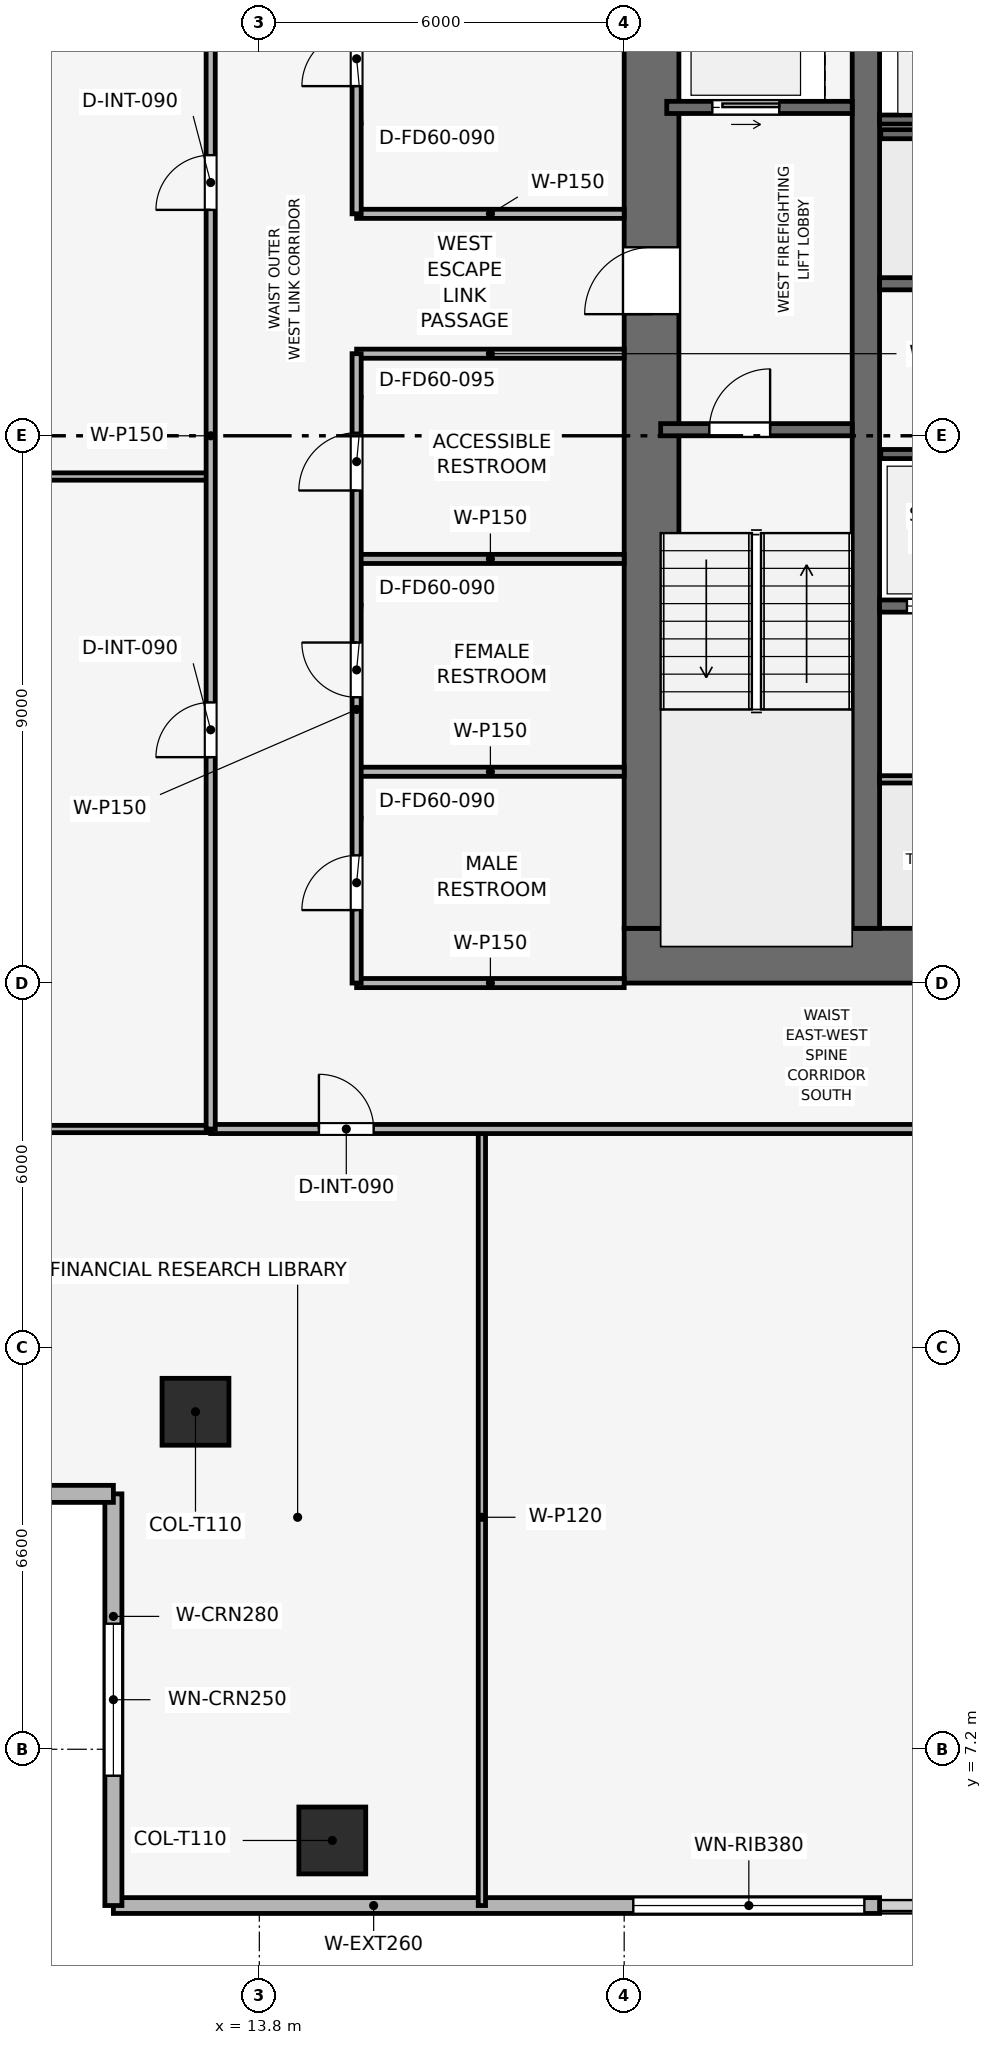
"""IFC4 building model, lengths in metres.
Left out: names, types, materials, properties, quantities, classifications, styles, units other than length and angle.
Written with IfcOpenShell. Run it as: python <this file> out.ifc"""

import sys

from ifc_helpers import new_model, si_unit, direction, frame, frame_2d, origin, origin_2d, place, context, subcontext, project, spatial, rectangle, extrude, element, fill, save


model = new_model("IFC4")
c1 = context("Model", 3, precision=1e-05, world=origin(), true_north=direction((0.0, 1.0)))
c2 = subcontext(c1, "Body", "Model", "MODEL_VIEW")
j1 = project(units=[si_unit("LENGTHUNIT", "METRE"), si_unit("PLANEANGLEUNIT", "RADIAN")], contexts=[c1])
p1 = place(None, origin())
s1 = spatial("IfcSite", under=j1, at=p1, CompositionType="ELEMENT")
p2 = place(p1, origin())
s2 = spatial("IfcBuilding", under=s1, at=p2, CompositionType="ELEMENT")
p3 = place(p2, frame((0.0, 0.0, 164.55)))
s3 = spatial("IfcBuildingStorey", under=s2, at=p3, CompositionType="ELEMENT", Elevation=164.55)
p4 = place(p3, frame((19.8, 20.25, 0.0), z_axis=(0.0, 0.0, 1.0), x_axis=(1.0, 0.0, 0.0)))
e1 = element("IfcWall", 1, at=p4, inside=s3, PredefinedType="SHEAR", context=c2, shape_type="SweptSolid", body=[
    extrude(rectangle(XDim=18.0, YDim=0.9, at=frame_2d((9.0, 0.0))), origin(), (0.0, 0.0, 1.0), 3.75),
])
p5 = place(p4, frame((8.4, 0.0, 0.0)))
e2 = element("IfcOpeningElement", 2, at=p5, cuts=e1, PredefinedType="OPENING", context=c2, shape_type="SweptSolid", body=[
    extrude(rectangle(XDim=1.2, YDim=2.2, at=frame_2d((0.6, 1.1))), frame((0.0, 0.46, 0.0), z_axis=(0.0, -1.0, 0.0), x_axis=(1.0, 0.0, 0.0)), (0.0, 0.0, 1.0), 0.92),
])
p6 = place(p3, frame((20.25, 20.7, 0.0), z_axis=(0.0, 0.0, 1.0), x_axis=(0.0, 1.0, 0.0)))
e3 = element("IfcWall", 3, at=p6, inside=s3, PredefinedType="SHEAR", context=c2, shape_type="SweptSolid", body=[
    extrude(rectangle(XDim=16.2, YDim=0.9, at=frame_2d((8.1, 0.0))), origin(), (0.0, 0.0, 1.0), 3.75),
])
p7 = place(p6, frame((10.1, 0.0, 0.0)))
e4 = element("IfcOpeningElement", 4, at=p7, cuts=e3, PredefinedType="OPENING", context=c2, shape_type="SweptSolid", body=[
    extrude(rectangle(XDim=1.1, YDim=2.15, at=frame_2d((0.55, 1.075))), frame((0.0, 0.46, 0.0), z_axis=(0.0, -1.0, 0.0), x_axis=(1.0, 0.0, 0.0)), (0.0, 0.0, 1.0), 0.92),
])
p8 = place(p3, frame((23.775, 20.7, 0.0), z_axis=(0.0, 0.0, 1.0), x_axis=(0.0, 1.0, 0.0)))
e5 = element("IfcWall", 5, at=p8, inside=s3, PredefinedType="SHEAR", context=c2, shape_type="SweptSolid", body=[
    extrude(rectangle(XDim=16.2, YDim=0.45, at=frame_2d((8.1, 0.0))), origin(), (0.0, 0.0, 1.0), 3.75),
])
for number, where, z_axis, x_axis in (
    (6, (15.0, 5.7, 0.003), (0.0, 0.0, 1.0), (1.0, 0.0, 0.0)),
    (7, (12.75, 12.75, 0.003), (0.0, 0.0, 1.0), (1.0, 0.0, 0.0)),
):
    element("IfcColumn", number, at=place(p3, frame(where, z_axis=z_axis, x_axis=x_axis)), inside=s3, PredefinedType="COLUMN", context=c2, shape_type="SweptSolid", body=[
        extrude(rectangle(XDim=1.1, YDim=1.1, at=origin_2d()), origin(), (0.0, 0.0, 1.0), 3.489),
    ])
p9 = place(p3, frame((24.0, 4.63, 0.0), z_axis=(0.0, 0.0, 1.0), x_axis=(-1.0, 0.0, 0.0)))
e8 = element("IfcWall", 8, at=p9, inside=s3, PredefinedType="SOLIDWALL", context=c2, shape_type="SweptSolid", body=[
    extrude(rectangle(XDim=12.6, YDim=0.26, at=frame_2d((6.3, 0.0))), origin(), (0.0, 0.0, 1.0), 3.495),
])
p10 = place(p9, frame((0.25, 0.0, 0.9)))
e9 = element("IfcOpeningElement", 9, at=p10, cuts=e8, PredefinedType="OPENING", context=c2, shape_type="SweptSolid", body=[
    extrude(rectangle(XDim=3.8, YDim=1.9, at=frame_2d((1.9, 0.95))), frame((0.0, 0.14, 0.0), z_axis=(0.0, -1.0, 0.0), x_axis=(1.0, 0.0, 0.0)), (0.0, 0.0, 1.0), 0.28),
])
p11 = place(p3, frame((11.4, 4.63, 0.0), z_axis=(0.0, 0.0, 1.0), x_axis=(0.0, 1.0, 0.0)))
e10 = element("IfcWall", 10, at=p11, inside=s3, PredefinedType="SOLIDWALL", context=c2, shape_type="SweptSolid", body=[
    extrude(rectangle(XDim=6.77, YDim=0.28, at=frame_2d((3.385, 0.0))), origin(), (0.0, 0.0, 1.0), 3.495),
])
p12 = place(p11, frame((2.135, 0.0, 0.9)))
e11 = element("IfcOpeningElement", 11, at=p12, cuts=e10, PredefinedType="OPENING", context=c2, shape_type="SweptSolid", body=[
    extrude(rectangle(XDim=2.5, YDim=1.9, at=frame_2d((1.25, 0.95))), frame((0.0, 0.15, 0.0), z_axis=(0.0, -1.0, 0.0), x_axis=(1.0, 0.0, 0.0)), (0.0, 0.0, 1.0), 0.3),
])
p13 = place(p3, frame((11.4, 11.4, 0.0), z_axis=(0.0, 0.0, 1.0), x_axis=(-1.0, 0.0, 0.0)))
e12 = element("IfcWall", 12, at=p13, inside=s3, PredefinedType="SOLIDWALL", context=c2, shape_type="SweptSolid", body=[
    extrude(rectangle(XDim=6.77, YDim=0.28, at=frame_2d((3.385, 0.0))), origin(), (0.0, 0.0, 1.0), 3.495),
])
p14 = place(p13, frame((2.135, 0.0, 0.9)))
e13 = element("IfcOpeningElement", 13, at=p14, cuts=e12, PredefinedType="OPENING", context=c2, shape_type="SweptSolid", body=[
    extrude(rectangle(XDim=2.5, YDim=1.9, at=frame_2d((1.25, 0.95))), frame((0.0, 0.15, 0.0), z_axis=(0.0, -1.0, 0.0), x_axis=(1.0, 0.0, 0.0)), (0.0, 0.0, 1.0), 0.3),
])
p15 = place(p3, frame((20.4, 28.9, 0.0), z_axis=(0.0, 0.0, 1.0), x_axis=(1.0, 0.0, 0.0)))
e14 = element("IfcWall", 14, at=p15, inside=s3, PredefinedType="SHEAR", context=c2, shape_type="SweptSolid", body=[
    extrude(rectangle(XDim=3.15, YDim=0.2, at=frame_2d((1.575, 0.0))), origin(), (0.0, 0.0, 1.0), 3.495),
])
p16 = place(p15, frame((0.8, 0.0, 0.0)))
e15 = element("IfcOpeningElement", 15, at=p16, cuts=e14, PredefinedType="OPENING", context=c2, shape_type="SweptSolid", body=[
    extrude(rectangle(XDim=1.0, YDim=2.1, at=frame_2d((0.5, 1.05))), frame((0.0, 0.11, 0.0), z_axis=(0.0, -1.0, 0.0), x_axis=(1.0, 0.0, 0.0)), (0.0, 0.0, 1.0), 0.22),
])
p17 = place(p3, frame((20.5, 34.2, 0.0), z_axis=(0.0, 0.0, 1.0), x_axis=(1.0, 0.0, 0.0)))
e16 = element("IfcWall", 16, at=p17, inside=s3, PredefinedType="SHEAR", context=c2, shape_type="SweptSolid", body=[
    extrude(rectangle(XDim=3.05, YDim=0.2, at=frame_2d((1.525, 0.0))), origin(), (0.0, 0.0, 1.0), 3.495),
])
p18 = place(p17, frame((0.75, 0.0, 0.0)))
e17 = element("IfcOpeningElement", 17, at=p18, cuts=e16, PredefinedType="OPENING", context=c2, shape_type="SweptSolid", body=[
    extrude(rectangle(XDim=1.1, YDim=2.15, at=frame_2d((0.55, 1.075))), frame((0.0, 0.11, 0.0), z_axis=(0.0, -1.0, 0.0), x_axis=(1.0, 0.0, 0.0)), (0.0, 0.0, 1.0), 0.22),
])
p19 = place(p3, frame((24.0, 34.0, 0.0), z_axis=(0.0, 0.0, 1.0), x_axis=(1.0, 0.0, 0.0)))
e18 = element("IfcWall", 18, at=p19, inside=s3, PredefinedType="SHEAR", context=c2, shape_type="SweptSolid", body=[
    extrude(rectangle(XDim=2.48, YDim=0.15, at=frame_2d((1.24, 0.0))), origin(), (0.0, 0.0, 1.0), 3.495),
])
p20 = place(p3, frame((24.0, 26.0, 0.0), z_axis=(0.0, 0.0, 1.0), x_axis=(1.0, 0.0, 0.0)))
e19 = element("IfcWall", 19, at=p20, inside=s3, PredefinedType="SHEAR", context=c2, shape_type="SweptSolid", body=[
    extrude(rectangle(XDim=2.0, YDim=0.2, at=frame_2d((1.0, 0.0))), origin(), (0.0, 0.0, 1.0), 3.495),
])
p21 = place(p20, frame((0.45, 0.0, 0.0)))
e20 = element("IfcOpeningElement", 20, at=p21, cuts=e19, PredefinedType="OPENING", context=c2, shape_type="SweptSolid", body=[
    extrude(rectangle(XDim=1.1, YDim=2.15, at=frame_2d((0.55, 1.075))), frame((0.0, 0.11, 0.0), z_axis=(0.0, -1.0, 0.0), x_axis=(1.0, 0.0, 0.0)), (0.0, 0.0, 1.0), 0.22),
])
p22 = place(p3, frame((24.0, 31.3, 0.0), z_axis=(0.0, 0.0, 1.0), x_axis=(1.0, 0.0, 0.0)))
e21 = element("IfcWall", 21, at=p22, inside=s3, PredefinedType="SHEAR", context=c2, shape_type="SweptSolid", body=[
    extrude(rectangle(XDim=2.0, YDim=0.2, at=frame_2d((1.0, 0.0))), origin(), (0.0, 0.0, 1.0), 3.495),
])
for number, where, z_axis, x_axis in (
    (22, (24.02, 28.5, 0.0), (0.0, 0.0, 1.0), (1.0, 0.0, 0.0)),
    (23, (24.02, 33.76, 0.0), (0.0, 0.0, 1.0), (1.0, 0.0, 0.0)),
):
    element("IfcWall", number, at=place(p3, frame(where, z_axis=z_axis, x_axis=x_axis)), inside=s3, PredefinedType="SHEAR", context=c2, shape_type="SweptSolid", body=[
        extrude(rectangle(XDim=4.08, YDim=0.15, at=frame_2d((2.04, 0.0))), origin(), (0.0, 0.0, 1.0), 3.495),
    ])
p23 = place(p3, frame((24.0, 23.15, 0.0), z_axis=(0.0, 0.0, 1.0), x_axis=(1.0, 0.0, 0.0)))
e24 = element("IfcWall", 24, at=p23, inside=s3, PredefinedType="PARTITIONING", context=c2, shape_type="SweptSolid", body=[
    extrude(rectangle(XDim=4.05, YDim=0.12, at=frame_2d((2.025, 0.0))), origin(), (0.0, 0.0, 1.0), 3.495),
])
p24 = place(p23, frame((1.575, 0.0, 0.0)))
e25 = element("IfcOpeningElement", 25, at=p24, cuts=e24, PredefinedType="OPENING", context=c2, shape_type="SweptSolid", body=[
    extrude(rectangle(XDim=0.9, YDim=2.1, at=frame_2d((0.45, 1.05))), frame((0.0, 0.07, 0.0), z_axis=(0.0, -1.0, 0.0), x_axis=(1.0, 0.0, 0.0)), (0.0, 0.0, 1.0), 0.14),
])
p25 = place(p3, frame((15.4, 19.8, 0.0), z_axis=(0.0, 0.0, 1.0), x_axis=(1.0, 0.0, 0.0)))
e26 = element("IfcWall", 26, at=p25, inside=s3, PredefinedType="PARTITIONING", context=c2, shape_type="SweptSolid", body=[
    extrude(rectangle(XDim=4.4, YDim=0.15, at=frame_2d((2.2, 0.0))), origin(), (0.0, 0.0, 1.0), 3.03),
])
for number, where, z_axis, x_axis in (
    (27, (15.4, 23.275, 0.0), (0.0, 0.0, 1.0), (1.0, 0.0, 0.0)),
    (28, (15.4, 26.775, 0.0), (0.0, 0.0, 1.0), (1.0, 0.0, 0.0)),
    (29, (15.4, 30.15, 0.0), (0.0, 0.0, 1.0), (1.0, 0.0, 0.0)),
    (30, (15.4, 32.45, 0.0), (0.0, 0.0, 1.0), (1.0, 0.0, 0.0)),
):
    element("IfcWall", number, at=place(p3, frame(where, z_axis=z_axis, x_axis=x_axis)), inside=s3, PredefinedType="PARTITIONING", context=c2, shape_type="SweptSolid", body=[
        extrude(rectangle(XDim=4.4, YDim=0.15, at=frame_2d((2.2, 0.0))), origin(), (0.0, 0.0, 1.0), 3.495),
    ])
p26 = place(p3, frame((15.4, 19.8, 0.0), z_axis=(0.0, 0.0, 1.0), x_axis=(0.0, 1.0, 0.0)))
e31 = element("IfcWall", 31, at=p26, inside=s3, PredefinedType="PARTITIONING", context=c2, shape_type="SweptSolid", body=[
    extrude(rectangle(XDim=10.35, YDim=0.15, at=frame_2d((5.175, 0.0))), origin(), (0.0, 0.0, 1.0), 3.03),
])
p27 = place(p26, frame((1.2, 0.0, 0.0)))
e32 = element("IfcOpeningElement", 32, at=p27, cuts=e31, PredefinedType="OPENING", context=c2, shape_type="SweptSolid", body=[
    extrude(rectangle(XDim=0.9, YDim=2.1, at=frame_2d((0.45, 1.05))), frame((0.0, 0.085, 0.0), z_axis=(0.0, -1.0, 0.0), x_axis=(1.0, 0.0, 0.0)), (0.0, 0.0, 1.0), 0.17),
])
p28 = place(p26, frame((4.7, 0.0, 0.0)))
e33 = element("IfcOpeningElement", 33, at=p28, cuts=e31, PredefinedType="OPENING", context=c2, shape_type="SweptSolid", body=[
    extrude(rectangle(XDim=0.9, YDim=2.1, at=frame_2d((0.45, 1.05))), frame((0.0, 0.085, 0.0), z_axis=(0.0, -1.0, 0.0), x_axis=(1.0, 0.0, 0.0)), (0.0, 0.0, 1.0), 0.17),
])
p29 = place(p26, frame((8.1, 0.0, 0.0)))
e34 = element("IfcOpeningElement", 34, at=p29, cuts=e31, PredefinedType="OPENING", context=c2, shape_type="SweptSolid", body=[
    extrude(rectangle(XDim=0.95, YDim=2.1, at=frame_2d((0.475, 1.05))), frame((0.0, 0.085, 0.0), z_axis=(0.0, -1.0, 0.0), x_axis=(1.0, 0.0, 0.0)), (0.0, 0.0, 1.0), 0.17),
])
p30 = place(p3, frame((15.4, 32.45, 0.0), z_axis=(0.0, 0.0, 1.0), x_axis=(0.0, 1.0, 0.0)))
e35 = element("IfcWall", 35, at=p30, inside=s3, PredefinedType="PARTITIONING", context=c2, shape_type="SweptSolid", body=[
    extrude(rectangle(XDim=5.35, YDim=0.15, at=frame_2d((2.675, 0.0))), origin(), (0.0, 0.0, 1.0), 3.03),
])
p31 = place(p30, frame((2.1, 0.0, 0.0)))
e36 = element("IfcOpeningElement", 36, at=p31, cuts=e35, PredefinedType="OPENING", context=c2, shape_type="SweptSolid", body=[
    extrude(rectangle(XDim=0.9, YDim=2.1, at=frame_2d((0.45, 1.05))), frame((0.0, 0.085, 0.0), z_axis=(0.0, -1.0, 0.0), x_axis=(1.0, 0.0, 0.0)), (0.0, 0.0, 1.0), 0.17),
])
p32 = place(p3, frame((17.46, 4.63, 0.0), z_axis=(0.0, 0.0, 1.0), x_axis=(0.0, 1.0, 0.0)))
e37 = element("IfcWall", 37, at=p32, inside=s3, PredefinedType="PARTITIONING", context=c2, shape_type="SweptSolid", body=[
    extrude(rectangle(XDim=12.77, YDim=0.12, at=frame_2d((6.385, 0.0))), origin(), (0.0, 0.0, 1.0), 2.98),
])
for number, where, z_axis, x_axis in (
    (38, (4.63, 28.13, 0.0), (0.0, 0.0, 1.0), (1.0, 0.0, 0.0)),
    (39, (4.63, 17.4, 0.0), (0.0, 0.0, 1.0), (1.0, 0.0, 0.0)),
):
    element("IfcWall", number, at=place(p3, frame(where, z_axis=z_axis, x_axis=x_axis)), inside=s3, PredefinedType="PARTITIONING", context=c2, shape_type="SweptSolid", body=[
        extrude(rectangle(XDim=8.37, YDim=0.12, at=frame_2d((4.185, 0.0))), origin(), (0.0, 0.0, 1.0), 2.98),
    ])
p33 = place(p3, frame((13.0, 17.4, 0.0), z_axis=(0.0, 0.0, 1.0), x_axis=(1.0, 0.0, 0.0)))
e40 = element("IfcWall", 40, at=p33, inside=s3, PredefinedType="PARTITIONING", context=c2, shape_type="SweptSolid", body=[
    extrude(rectangle(XDim=31.6, YDim=0.15, at=frame_2d((15.8, 0.0))), origin(), (0.0, 0.0, 1.0), 3.03),
])
p34 = place(p33, frame((1.78, 0.0, 0.0)))
e41 = element("IfcOpeningElement", 41, at=p34, cuts=e40, PredefinedType="OPENING", context=c2, shape_type="SweptSolid", body=[
    extrude(rectangle(XDim=0.9, YDim=2.1, at=frame_2d((0.45, 1.05))), frame((0.0, 0.085, 0.0), z_axis=(0.0, -1.0, 0.0), x_axis=(1.0, 0.0, 0.0)), (0.0, 0.0, 1.0), 0.17),
])
p35 = place(p33, frame((17.58, 0.0, 0.0)))
e42 = element("IfcOpeningElement", 42, at=p35, cuts=e40, PredefinedType="OPENING", context=c2, shape_type="SweptSolid", body=[
    extrude(rectangle(XDim=0.9, YDim=2.1, at=frame_2d((0.45, 1.05))), frame((0.0, 0.085, 0.0), z_axis=(0.0, -1.0, 0.0), x_axis=(1.0, 0.0, 0.0)), (0.0, 0.0, 1.0), 0.17),
])
p36 = place(p3, frame((13.0, 17.4, 0.0), z_axis=(0.0, 0.0, 1.0), x_axis=(0.0, 1.0, 0.0)))
e43 = element("IfcWall", 43, at=p36, inside=s3, PredefinedType="PARTITIONING", context=c2, shape_type="SweptSolid", body=[
    extrude(rectangle(XDim=22.8, YDim=0.15, at=frame_2d((11.4, 0.0))), origin(), (0.0, 0.0, 1.0), 3.03),
])
p37 = place(p36, frame((6.115, 0.0, 0.0)))
e44 = element("IfcOpeningElement", 44, at=p37, cuts=e43, PredefinedType="OPENING", context=c2, shape_type="SweptSolid", body=[
    extrude(rectangle(XDim=0.9, YDim=2.1, at=frame_2d((0.45, 1.05))), frame((0.0, 0.085, 0.0), z_axis=(0.0, -1.0, 0.0), x_axis=(1.0, 0.0, 0.0)), (0.0, 0.0, 1.0), 0.17),
])
p38 = place(p36, frame((15.115, 0.0, 0.0)))
e45 = element("IfcOpeningElement", 45, at=p38, cuts=e43, PredefinedType="OPENING", context=c2, shape_type="SweptSolid", body=[
    extrude(rectangle(XDim=0.9, YDim=2.1, at=frame_2d((0.45, 1.05))), frame((0.0, 0.085, 0.0), z_axis=(0.0, -1.0, 0.0), x_axis=(1.0, 0.0, 0.0)), (0.0, 0.0, 1.0), 0.17),
])
p39 = place(p10, origin())
e46 = element("IfcWindow", 46, at=p39, inside=s3, PartitioningType="SINGLE_PANEL", PredefinedType="WINDOW", context=c2, shape_type="SweptSolid", body=[
    extrude(rectangle(XDim=3.8, YDim=1.9, at=frame_2d((1.9, 0.95))), frame((0.0, 0.03, 0.0), z_axis=(0.0, -1.0, 0.0), x_axis=(1.0, 0.0, 0.0)), (0.0, 0.0, 1.0), 0.06),
])
fill(e9, e46)
p40 = place(p12, origin())
e47 = element("IfcWindow", 47, at=p40, inside=s3, PartitioningType="SINGLE_PANEL", PredefinedType="WINDOW", context=c2, shape_type="SweptSolid", body=[
    extrude(rectangle(XDim=2.5, YDim=1.9, at=frame_2d((1.25, 0.95))), frame((0.0, 0.03, 0.0), z_axis=(0.0, -1.0, 0.0), x_axis=(1.0, 0.0, 0.0)), (0.0, 0.0, 1.0), 0.06),
])
fill(e11, e47)
p41 = place(p16, origin())
e48 = element("IfcDoor", 48, at=p41, inside=s3, OperationType="SINGLE_SWING_RIGHT", PredefinedType="DOOR", context=c2, shape_type="SweptSolid", body=[
    extrude(rectangle(XDim=1.0, YDim=2.1, at=frame_2d((0.5, 1.05))), frame((0.0, 0.025, 0.0), z_axis=(0.0, -1.0, 0.0), x_axis=(1.0, 0.0, 0.0)), (0.0, 0.0, 1.0), 0.05),
])
fill(e15, e48)
p42 = place(p18, origin())
e49 = element("IfcDoor", 49, at=p42, inside=s3, OperationType="SLIDING_TO_RIGHT", PredefinedType="DOOR", context=c2, shape_type="SweptSolid", body=[
    extrude(rectangle(XDim=1.1, YDim=2.15, at=frame_2d((0.55, 1.075))), frame((0.0, 0.025, 0.0), z_axis=(0.0, -1.0, 0.0), x_axis=(1.0, 0.0, 0.0)), (0.0, 0.0, 1.0), 0.05),
])
fill(e17, e49)
p43 = place(p21, origin())
e50 = element("IfcDoor", 50, at=p43, inside=s3, OperationType="SLIDING_TO_RIGHT", PredefinedType="DOOR", context=c2, shape_type="SweptSolid", body=[
    extrude(rectangle(XDim=1.1, YDim=2.15, at=frame_2d((0.55, 1.075))), frame((0.0, 0.025, 0.0), z_axis=(0.0, -1.0, 0.0), x_axis=(1.0, 0.0, 0.0)), (0.0, 0.0, 1.0), 0.05),
])
fill(e20, e50)
p44 = place(p27, origin())
e51 = element("IfcDoor", 51, at=p44, inside=s3, OperationType="SINGLE_SWING_LEFT", PredefinedType="DOOR", context=c2, shape_type="SweptSolid", body=[
    extrude(rectangle(XDim=0.9, YDim=2.1, at=frame_2d((0.45, 1.05))), frame((0.0, 0.025, 0.0), z_axis=(0.0, -1.0, 0.0), x_axis=(1.0, 0.0, 0.0)), (0.0, 0.0, 1.0), 0.05),
])
fill(e32, e51)
p45 = place(p28, origin())
e52 = element("IfcDoor", 52, at=p45, inside=s3, OperationType="SINGLE_SWING_RIGHT", PredefinedType="DOOR", context=c2, shape_type="SweptSolid", body=[
    extrude(rectangle(XDim=0.9, YDim=2.1, at=frame_2d((0.45, 1.05))), frame((0.0, 0.025, 0.0), z_axis=(0.0, -1.0, 0.0), x_axis=(1.0, 0.0, 0.0)), (0.0, 0.0, 1.0), 0.05),
])
fill(e33, e52)
p46 = place(p29, origin())
e53 = element("IfcDoor", 53, at=p46, inside=s3, OperationType="SINGLE_SWING_LEFT", PredefinedType="DOOR", context=c2, shape_type="SweptSolid", body=[
    extrude(rectangle(XDim=0.95, YDim=2.1, at=frame_2d((0.475, 1.05))), frame((0.0, 0.025, 0.0), z_axis=(0.0, -1.0, 0.0), x_axis=(1.0, 0.0, 0.0)), (0.0, 0.0, 1.0), 0.05),
])
fill(e34, e53)
p47 = place(p31, origin())
e54 = element("IfcDoor", 54, at=p47, inside=s3, OperationType="SINGLE_SWING_LEFT", PredefinedType="DOOR", context=c2, shape_type="SweptSolid", body=[
    extrude(rectangle(XDim=0.9, YDim=2.1, at=frame_2d((0.45, 1.05))), frame((0.0, 0.025, 0.0), z_axis=(0.0, -1.0, 0.0), x_axis=(1.0, 0.0, 0.0)), (0.0, 0.0, 1.0), 0.05),
])
fill(e36, e54)
p48 = place(p34, origin())
e55 = element("IfcDoor", 55, at=p48, inside=s3, OperationType="SINGLE_SWING_LEFT", PredefinedType="DOOR", context=c2, shape_type="SweptSolid", body=[
    extrude(rectangle(XDim=0.9, YDim=2.1, at=frame_2d((0.45, 1.05))), frame((0.0, 0.025, 0.0), z_axis=(0.0, -1.0, 0.0), x_axis=(1.0, 0.0, 0.0)), (0.0, 0.0, 1.0), 0.05),
])
fill(e41, e55)
p49 = place(p37, origin())
e56 = element("IfcDoor", 56, at=p49, inside=s3, OperationType="SINGLE_SWING_LEFT", PredefinedType="DOOR", context=c2, shape_type="SweptSolid", body=[
    extrude(rectangle(XDim=0.9, YDim=2.1, at=frame_2d((0.45, 1.05))), frame((0.0, 0.025, 0.0), z_axis=(0.0, -1.0, 0.0), x_axis=(1.0, 0.0, 0.0)), (0.0, 0.0, 1.0), 0.05),
])
fill(e44, e56)
p50 = place(p38, origin())
e57 = element("IfcDoor", 57, at=p50, inside=s3, OperationType="SINGLE_SWING_LEFT", PredefinedType="DOOR", context=c2, shape_type="SweptSolid", body=[
    extrude(rectangle(XDim=0.9, YDim=2.1, at=frame_2d((0.45, 1.05))), frame((0.0, 0.025, 0.0), z_axis=(0.0, -1.0, 0.0), x_axis=(1.0, 0.0, 0.0)), (0.0, 0.0, 1.0), 0.05),
])
fill(e45, e57)
p51 = place(p7, origin())
e58 = element("IfcDoor", 58, at=p51, inside=s3, OperationType="SINGLE_SWING_LEFT", PredefinedType="DOOR", context=c2, shape_type="SweptSolid", body=[
    extrude(rectangle(XDim=1.1, YDim=2.15, at=frame_2d((0.55, 1.075))), frame((0.0, 0.025, 0.0), z_axis=(0.0, -1.0, 0.0), x_axis=(1.0, 0.0, 0.0)), (0.0, 0.0, 1.0), 0.05),
])
fill(e4, e58)
save(model, sys.argv[1])
